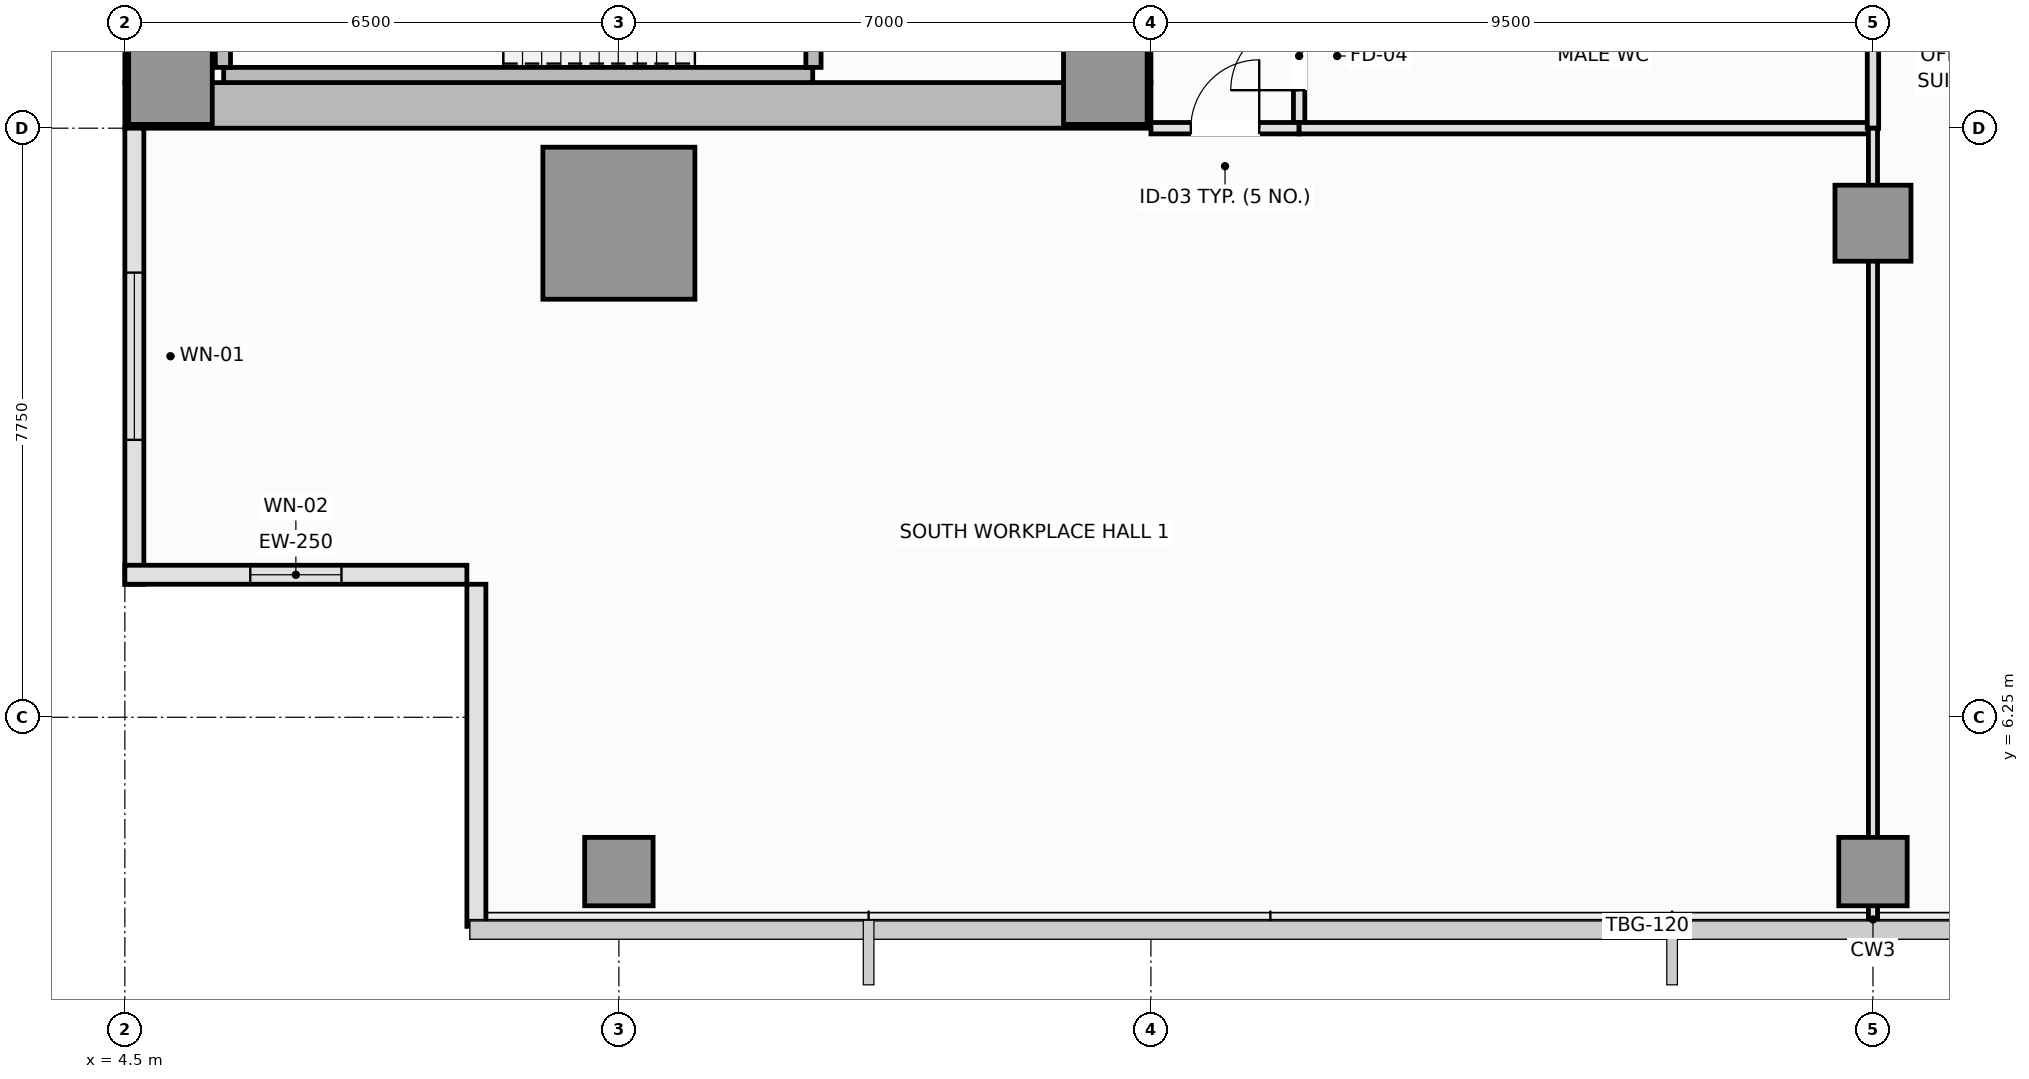
"""IFC4 building model, lengths in metres.
Left out: names, types, materials, properties, quantities, classifications, styles, units other than length and angle.
Written with IfcOpenShell. Run it as: python <this file> out.ifc"""

import sys

from ifc_helpers import new_model, si_unit, direction, frame, frame_2d, origin, origin_2d, place, context, subcontext, project, spatial, rectangle, extrude, element, fill, save


model = new_model("IFC4")
c1 = context("Model", 3, precision=1e-05, world=origin(), true_north=direction((0.0, 1.0)))
c2 = subcontext(c1, "Body", "Model", "MODEL_VIEW")
j1 = project(units=[si_unit("LENGTHUNIT", "METRE"), si_unit("PLANEANGLEUNIT", "RADIAN")], contexts=[c1])
p1 = place(None, origin())
s1 = spatial("IfcSite", under=j1, at=p1, CompositionType="ELEMENT")
p2 = place(p1, origin())
s2 = spatial("IfcBuilding", under=s1, at=p2, CompositionType="ELEMENT")
p3 = place(p2, frame((0.0, 0.0, 159.05)))
s3 = spatial("IfcBuildingStorey", under=s2, at=p3, CompositionType="ELEMENT", Elevation=159.05)
p4 = place(p3, frame((4.5, 14.3, 0.0), z_axis=(0.0, 0.0, 1.0), x_axis=(1.0, 0.0, 0.0)))
e1 = element("IfcWall", 1, at=p4, inside=s3, PredefinedType="SHEAR", context=c2, shape_type="SweptSolid", body=[
    extrude(rectangle(XDim=13.5, YDim=0.6, at=frame_2d((6.75, 0.0))), origin(), (0.0, 0.0, 1.0), 3.55),
])
p5 = place(p3, frame((4.8, 14.6, 0.0), z_axis=(0.0, 0.0, 1.0), x_axis=(0.0, 1.0, 0.0)))
e2 = element("IfcWall", 2, at=p5, inside=s3, PredefinedType="SHEAR", context=c2, shape_type="SweptSolid", body=[
    extrude(rectangle(XDim=21.3, YDim=0.6, at=frame_2d((10.65, 0.0))), origin(), (0.0, 0.0, 1.0), 3.55),
])
p6 = place(p3, frame((17.7, 14.6, 0.0), z_axis=(0.0, 0.0, 1.0), x_axis=(0.0, 1.0, 0.0)))
e3 = element("IfcWall", 3, at=p6, inside=s3, PredefinedType="SHEAR", context=c2, shape_type="SweptSolid", body=[
    extrude(rectangle(XDim=8.85, YDim=0.6, at=frame_2d((4.425, 0.0))), origin(), (0.0, 0.0, 1.0), 3.55),
])
p7 = place(p6, frame((4.3, 0.0, 0.0)))
e4 = element("IfcOpeningElement", 4, at=p7, cuts=e3, PredefinedType="OPENING", context=c2, shape_type="SweptSolid", body=[
    extrude(rectangle(XDim=1.1, YDim=2.15, at=frame_2d((0.55, 1.075))), frame((0.0, 0.31, 0.0), z_axis=(0.0, -1.0, 0.0), x_axis=(1.0, 0.0, 0.0)), (0.0, 0.0, 1.0), 0.62),
])
for number, where, z_axis, x_axis in (
    (5, (5.1, 14.6, 0.0), (0.0, 0.0, 1.0), (1.0, 0.0, 0.0)),
    (6, (17.4, 14.6, 0.0), (0.0, 0.0, 1.0), (1.0, 0.0, 0.0)),
):
    element("IfcColumn", number, at=place(p3, frame(where, z_axis=z_axis, x_axis=x_axis)), inside=s3, PredefinedType="PILASTER", context=c2, shape_type="SweptSolid", body=[
        extrude(rectangle(XDim=1.1, YDim=1.1, at=origin_2d()), origin(), (0.0, 0.0, 1.0), 3.55),
    ])
p8 = place(p3, frame((11.0, 12.75, 0.0), z_axis=(0.0, 0.0, 1.0), x_axis=(1.0, 0.0, 0.0)))
e7 = element("IfcColumn", 7, at=p8, inside=s3, PredefinedType="COLUMN", context=c2, shape_type="SweptSolid", body=[
    extrude(rectangle(XDim=2.0, YDim=2.0, at=origin_2d()), origin(), (0.0, 0.0, 1.0), 3.55),
])
p9 = place(p3, frame((27.5, 12.75, 0.0), z_axis=(0.0, 0.0, 1.0), x_axis=(1.0, 0.0, 0.0)))
e8 = element("IfcColumn", 8, at=p9, inside=s3, PredefinedType="COLUMN", context=c2, shape_type="SweptSolid", body=[
    extrude(rectangle(XDim=1.0, YDim=1.0, at=origin_2d()), origin(), (0.0, 0.0, 1.0), 3.55),
])
for number, where, z_axis, x_axis in (
    (9, (11.0, 4.22, 0.0), (0.0, 0.0, 1.0), (1.0, 0.0, 0.0)),
    (10, (27.5, 4.22, 0.0), (0.0, 0.0, 1.0), (1.0, 0.0, 0.0)),
):
    element("IfcColumn", number, at=place(p3, frame(where, z_axis=z_axis, x_axis=x_axis)), inside=s3, PredefinedType="COLUMN", context=c2, shape_type="SweptSolid", body=[
        extrude(rectangle(XDim=0.9, YDim=0.9, at=origin_2d()), origin(), (0.0, 0.0, 1.0), 3.55),
    ])
p10 = place(p3, frame((4.625, 14.0, 0.0), z_axis=(0.0, 0.0, 1.0), x_axis=(0.0, -1.0, 0.0)))
e11 = element("IfcWall", 11, at=p10, inside=s3, PredefinedType="SOLIDWALL", context=c2, shape_type="SweptSolid", body=[
    extrude(rectangle(XDim=6.0, YDim=0.25, at=frame_2d((3.0, 0.0))), origin(), (0.0, 0.0, 1.0), 3.37),
])
p11 = place(p10, frame((1.9, 0.0, 0.9)))
e12 = element("IfcOpeningElement", 12, at=p11, cuts=e11, PredefinedType="OPENING", context=c2, shape_type="SweptSolid", body=[
    extrude(rectangle(XDim=2.2, YDim=1.8, at=frame_2d((1.1, 0.9))), frame((0.0, 0.135, 0.0), z_axis=(0.0, -1.0, 0.0), x_axis=(1.0, 0.0, 0.0)), (0.0, 0.0, 1.0), 0.27),
])
p12 = place(p3, frame((4.5, 8.125, 0.0), z_axis=(0.0, 0.0, 1.0), x_axis=(1.0, 0.0, 0.0)))
e13 = element("IfcWall", 13, at=p12, inside=s3, PredefinedType="SOLIDWALL", context=c2, shape_type="SweptSolid", body=[
    extrude(rectangle(XDim=4.5, YDim=0.25, at=frame_2d((2.25, 0.0))), origin(), (0.0, 0.0, 1.0), 3.37),
])
p13 = place(p12, frame((1.65, 0.0, 0.9)))
e14 = element("IfcOpeningElement", 14, at=p13, cuts=e13, PredefinedType="OPENING", context=c2, shape_type="SweptSolid", body=[
    extrude(rectangle(XDim=1.2, YDim=1.8, at=frame_2d((0.6, 0.9))), frame((0.0, 0.135, 0.0), z_axis=(0.0, -1.0, 0.0), x_axis=(1.0, 0.0, 0.0)), (0.0, 0.0, 1.0), 0.27),
])
p14 = place(p3, frame((9.125, 8.0, 0.0), z_axis=(0.0, 0.0, 1.0), x_axis=(0.0, -1.0, 0.0)))
e15 = element("IfcWall", 15, at=p14, inside=s3, PredefinedType="SOLIDWALL", context=c2, shape_type="SweptSolid", body=[
    extrude(rectangle(XDim=4.5, YDim=0.25, at=frame_2d((2.25, 0.0))), origin(), (0.0, 0.0, 1.0), 3.37),
])
p15 = place(p3, frame((5.8, 14.7, 0.0), z_axis=(0.0, 0.0, 1.0), x_axis=(1.0, 0.0, 0.0)))
e16 = element("IfcWall", 16, at=p15, inside=s3, PredefinedType="SOLIDWALL", context=c2, shape_type="SweptSolid", body=[
    extrude(rectangle(XDim=7.75, YDim=0.2, at=frame_2d((3.875, 0.0))), origin(), (0.0, 0.0, 1.0), 3.55),
])
p16 = place(p3, frame((5.79, 14.8, 0.0), z_axis=(0.0, 0.0, 1.0), x_axis=(0.0, 1.0, 0.0)))
e17 = element("IfcWall", 17, at=p16, inside=s3, PredefinedType="SOLIDWALL", context=c2, shape_type="SweptSolid", body=[
    extrude(rectangle(XDim=3.05, YDim=0.2, at=frame_2d((1.525, 0.0))), origin(), (0.0, 0.0, 1.0), 3.55),
])
p17 = place(p3, frame((13.56, 14.8, 0.0), z_axis=(0.0, 0.0, 1.0), x_axis=(0.0, 1.0, 0.0)))
e18 = element("IfcWall", 18, at=p17, inside=s3, PredefinedType="SOLIDWALL", context=c2, shape_type="SweptSolid", body=[
    extrude(rectangle(XDim=3.05, YDim=0.2, at=frame_2d((1.525, 0.0))), origin(), (0.0, 0.0, 1.0), 3.55),
])
p18 = place(p17, frame((0.95, 0.0, 0.0)))
e19 = element("IfcOpeningElement", 19, at=p18, cuts=e18, PredefinedType="OPENING", context=c2, shape_type="SweptSolid", body=[
    extrude(rectangle(XDim=1.15, YDim=2.15, at=frame_2d((0.575, 1.075))), frame((0.0, 0.11, 0.0), z_axis=(0.0, -1.0, 0.0), x_axis=(1.0, 0.0, 0.0)), (0.0, 0.0, 1.0), 0.22),
])
p19 = place(p3, frame((19.95, 14.0, 0.0), z_axis=(0.0, 0.0, 1.0), x_axis=(0.0, 1.0, 0.0)))
e20 = element("IfcWall", 20, at=p19, inside=s3, PredefinedType="PLUMBINGWALL", context=c2, shape_type="SweptSolid", body=[
    extrude(rectangle(XDim=1.9, YDim=0.15, at=frame_2d((0.95, 0.0))), origin(), (0.0, 0.0, 1.0), 3.37),
])
p20 = place(p19, frame((0.5, 0.0, 0.0)))
e21 = element("IfcOpeningElement", 21, at=p20, cuts=e20, PredefinedType="OPENING", context=c2, shape_type="SweptSolid", body=[
    extrude(rectangle(XDim=0.9, YDim=2.1, at=frame_2d((0.45, 1.05))), frame((0.0, 0.085, 0.0), z_axis=(0.0, -1.0, 0.0), x_axis=(1.0, 0.0, 0.0)), (0.0, 0.0, 1.0), 0.17),
])
p21 = place(p3, frame((18.0, 14.0, 0.0), z_axis=(0.0, 0.0, 1.0), x_axis=(1.0, 0.0, 0.0)))
e22 = element("IfcWall", 22, at=p21, inside=s3, PredefinedType="PARTITIONING", context=c2, shape_type="SweptSolid", body=[
    extrude(rectangle(XDim=1.95, YDim=0.15, at=frame_2d((0.975, 0.0))), origin(), (0.0, 0.0, 1.0), 3.37),
])
p22 = place(p21, frame((0.525, 0.0, 0.0)))
e23 = element("IfcOpeningElement", 23, at=p22, cuts=e22, PredefinedType="OPENING", context=c2, shape_type="SweptSolid", body=[
    extrude(rectangle(XDim=0.9, YDim=2.1, at=frame_2d((0.45, 1.05))), frame((0.0, 0.085, 0.0), z_axis=(0.0, -1.0, 0.0), x_axis=(1.0, 0.0, 0.0)), (0.0, 0.0, 1.0), 0.17),
])
p23 = place(p3, frame((19.95, 14.0, 0.0), z_axis=(0.0, 0.0, 1.0), x_axis=(1.0, 0.0, 0.0)))
e24 = element("IfcWall", 24, at=p23, inside=s3, PredefinedType="PLUMBINGWALL", context=c2, shape_type="SweptSolid", body=[
    extrude(rectangle(XDim=7.55, YDim=0.15, at=frame_2d((3.775, 0.0))), origin(), (0.0, 0.0, 1.0), 3.37),
])
p24 = place(p3, frame((27.5, 14.0, 0.0), z_axis=(0.0, 0.0, 1.0), x_axis=(0.0, 1.0, 0.0)))
e25 = element("IfcWall", 25, at=p24, inside=s3, PredefinedType="PLUMBINGWALL", context=c2, shape_type="SweptSolid", body=[
    extrude(rectangle(XDim=1.9, YDim=0.15, at=frame_2d((0.95, 0.0))), origin(), (0.0, 0.0, 1.0), 3.37),
])
p25 = place(p3, frame((27.5, 3.51, 0.0), z_axis=(0.0, 0.0, 1.0), x_axis=(0.0, 1.0, 0.0)))
e26 = element("IfcWall", 26, at=p25, inside=s3, PredefinedType="PARTITIONING", context=c2, shape_type="SweptSolid", body=[
    extrude(rectangle(XDim=10.49, YDim=0.12, at=frame_2d((5.245, 0.0))), origin(), (0.0, 0.0, 1.0), 2.87),
])
p26 = place(p11, origin())
e27 = element("IfcWindow", 27, at=p26, inside=s3, PartitioningType="SINGLE_PANEL", PredefinedType="WINDOW", context=c2, shape_type="SweptSolid", body=[
    extrude(rectangle(XDim=2.2, YDim=1.8, at=frame_2d((1.1, 0.9))), frame((0.0, 0.03, 0.0), z_axis=(0.0, -1.0, 0.0), x_axis=(1.0, 0.0, 0.0)), (0.0, 0.0, 1.0), 0.06),
])
fill(e12, e27)
p27 = place(p13, origin())
e28 = element("IfcWindow", 28, at=p27, inside=s3, PartitioningType="SINGLE_PANEL", PredefinedType="WINDOW", context=c2, shape_type="SweptSolid", body=[
    extrude(rectangle(XDim=1.2, YDim=1.8, at=frame_2d((0.6, 0.9))), frame((0.0, 0.03, 0.0), z_axis=(0.0, -1.0, 0.0), x_axis=(1.0, 0.0, 0.0)), (0.0, 0.0, 1.0), 0.06),
])
fill(e14, e28)
p28 = place(p20, origin())
e29 = element("IfcDoor", 29, at=p28, inside=s3, OperationType="SINGLE_SWING_LEFT", PredefinedType="DOOR", context=c2, shape_type="SweptSolid", body=[
    extrude(rectangle(XDim=0.9, YDim=2.1, at=frame_2d((0.45, 1.05))), frame((0.0, 0.025, 0.0), z_axis=(0.0, -1.0, 0.0), x_axis=(1.0, 0.0, 0.0)), (0.0, 0.0, 1.0), 0.05),
])
fill(e21, e29)
p29 = place(p22, origin())
e30 = element("IfcDoor", 30, at=p29, inside=s3, OperationType="SINGLE_SWING_RIGHT", PredefinedType="DOOR", context=c2, shape_type="SweptSolid", body=[
    extrude(rectangle(XDim=0.9, YDim=2.1, at=frame_2d((0.45, 1.05))), frame((0.0, 0.025, 0.0), z_axis=(0.0, -1.0, 0.0), x_axis=(1.0, 0.0, 0.0)), (0.0, 0.0, 1.0), 0.05),
])
fill(e23, e30)
save(model, sys.argv[1])
